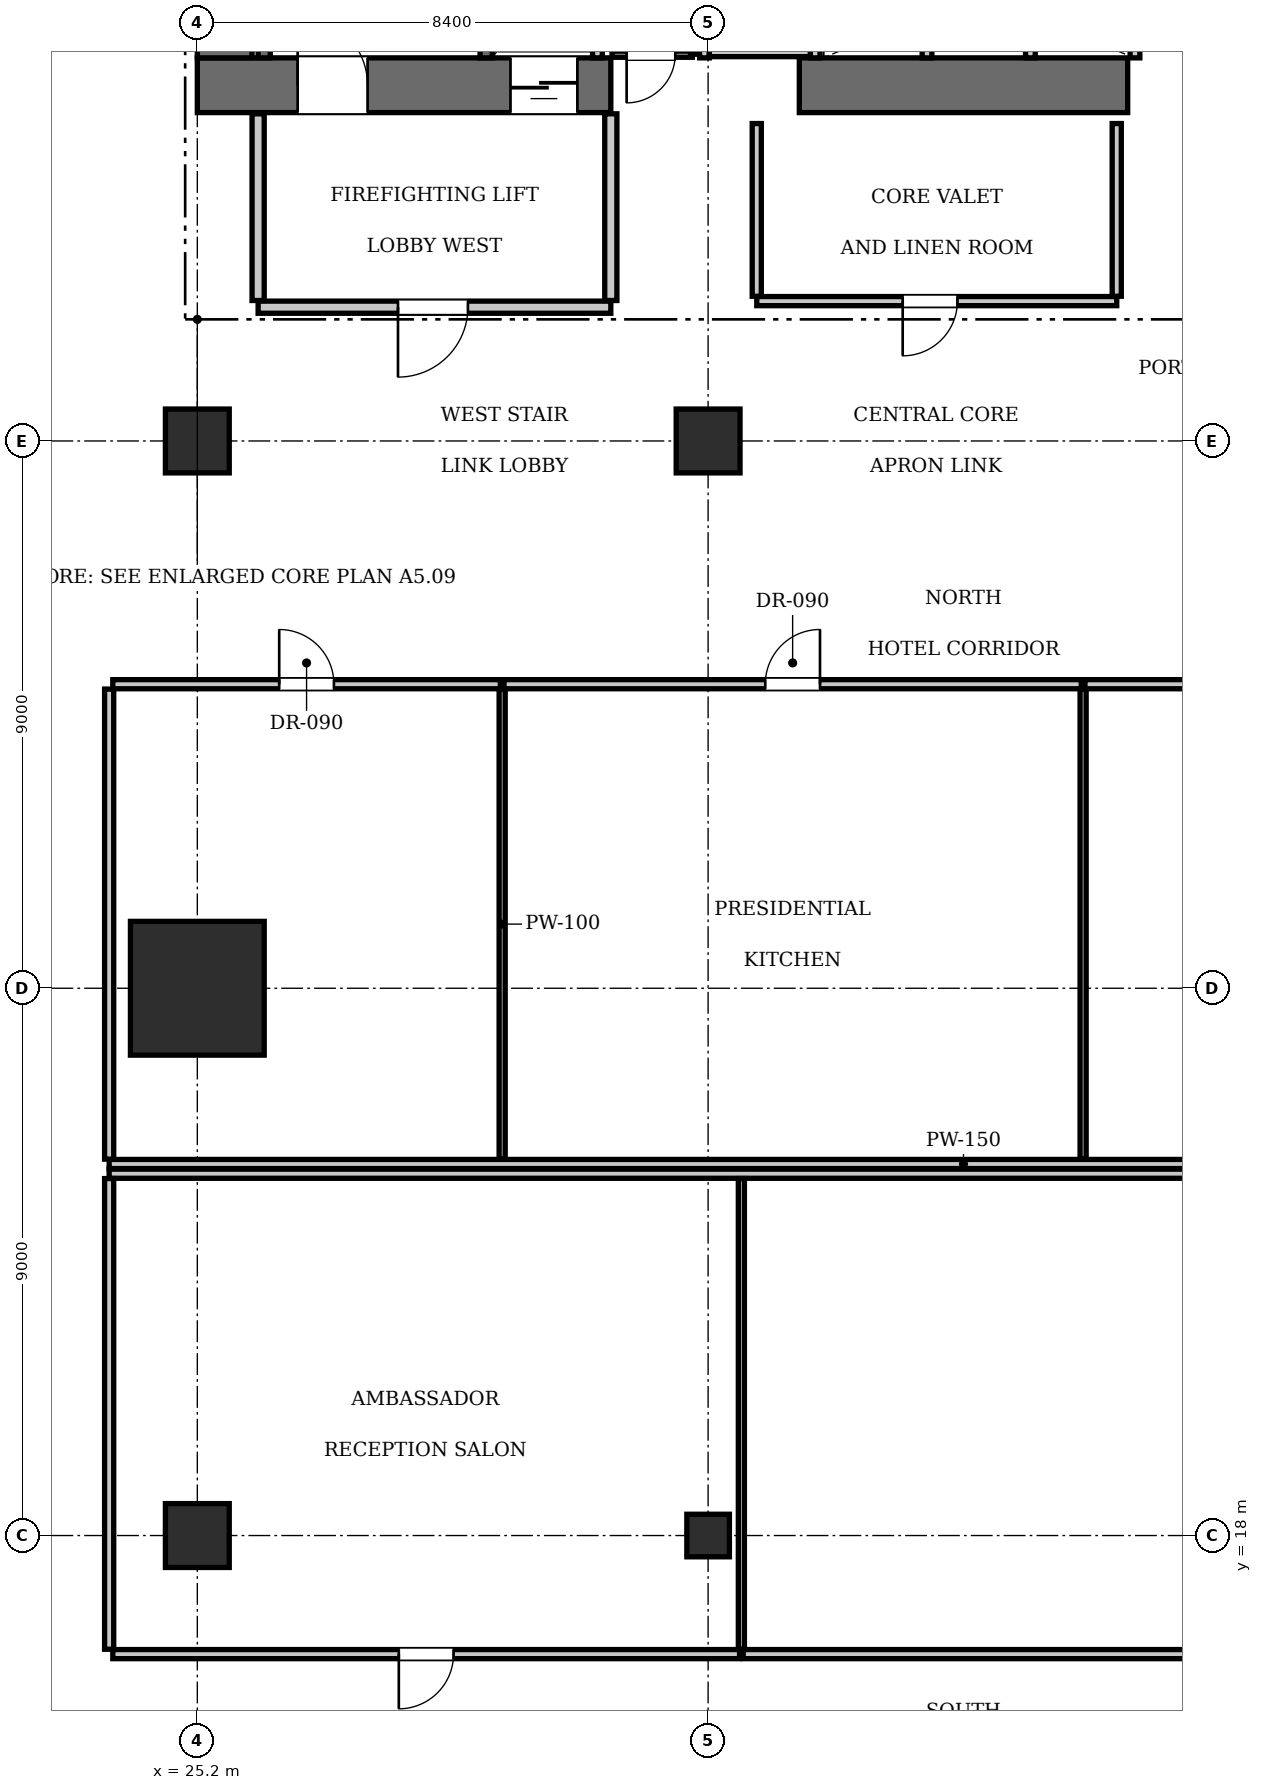
"""IFC4 building model, lengths in metres.
Left out: names, types, materials, properties, quantities, classifications, styles, units other than length and angle.
Written with IfcOpenShell. Run it as: python <this file> out.ifc"""

import sys

from ifc_helpers import new_model, si_unit, direction, frame, frame_2d, origin, origin_2d, place, context, subcontext, project, spatial, rectangle, i_section, extrude, element, fill, save


model = new_model("IFC4")
c1 = context("Model", 3, precision=1e-05, world=origin(), true_north=direction((0.0, 1.0)))
c2 = subcontext(c1, "Body", "Model", "MODEL_VIEW")
j1 = project(units=[si_unit("LENGTHUNIT", "METRE"), si_unit("PLANEANGLEUNIT", "RADIAN")], contexts=[c1])
p1 = place(None, origin())
s1 = spatial("IfcSite", under=j1, at=p1, CompositionType="ELEMENT")
p2 = place(p1, origin())
s2 = spatial("IfcBuilding", under=s1, at=p2, CompositionType="ELEMENT")
p3 = place(p2, frame((0.0, 0.0, 111.65)))
s3 = spatial("IfcBuildingStorey", under=s2, at=p3, CompositionType="ELEMENT", Elevation=111.65)
p4 = place(p3, frame((25.2, 27.0, 0.0), z_axis=(0.0, 0.0, 1.0), x_axis=(1.0, 0.0, 0.0)))
e1 = element("IfcColumn", 1, at=p4, inside=s3, PredefinedType="COLUMN", context=c2, shape_type="SweptSolid", body=[
    extrude(rectangle(XDim=2.2, YDim=2.2, at=origin_2d()), origin(), (0.0, 0.0, 1.0), 3.85),
])
p5 = place(p3, frame((25.2, 41.85, 0.0), z_axis=(0.0, 0.0, 1.0), x_axis=(1.0, 0.0, 0.0)))
e2 = element("IfcWall", 2, at=p5, inside=s3, PredefinedType="SHEAR", context=c2, shape_type="SweptSolid", body=[
    extrude(rectangle(XDim=6.8, YDim=0.9, at=frame_2d((3.4, 0.0))), origin(), (0.0, 0.0, 1.0), 3.85),
])
p6 = place(p5, frame((1.65, 0.0, 0.0)))
e3 = element("IfcOpeningElement", 3, at=p6, cuts=e2, PredefinedType="OPENING", context=c2, shape_type="SweptSolid", body=[
    extrude(rectangle(XDim=1.15, YDim=2.15, at=frame_2d((0.575, 1.075))), frame((0.0, 0.46, 0.0), z_axis=(0.0, -1.0, 0.0), x_axis=(1.0, 0.0, 0.0)), (0.0, 0.0, 1.0), 0.92),
])
p7 = place(p5, frame((5.15, 0.0, 0.0)))
e4 = element("IfcOpeningElement", 4, at=p7, cuts=e2, PredefinedType="OPENING", context=c2, shape_type="SweptSolid", body=[
    extrude(rectangle(XDim=1.1, YDim=2.2, at=frame_2d((0.55, 1.1))), frame((0.0, 0.46, 0.0), z_axis=(0.0, -1.0, 0.0), x_axis=(1.0, 0.0, 0.0)), (0.0, 0.0, 1.0), 0.92),
])
p8 = place(p3, frame((35.1, 41.85, 0.0), z_axis=(0.0, 0.0, 1.0), x_axis=(1.0, 0.0, 0.0)))
e5 = element("IfcWall", 5, at=p8, inside=s3, PredefinedType="SHEAR", context=c2, shape_type="SweptSolid", body=[
    extrude(rectangle(XDim=5.4, YDim=0.9, at=frame_2d((2.7, 0.0))), origin(), (0.0, 0.0, 1.0), 3.85),
])
p9 = place(p3, frame((25.65, 42.3, 0.0), z_axis=(0.0, 0.0, 1.0), x_axis=(0.0, 1.0, 0.0)))
e6 = element("IfcWall", 6, at=p9, inside=s3, PredefinedType="SHEAR", context=c2, shape_type="SweptSolid", body=[
    extrude(rectangle(XDim=1.6, YDim=0.9, at=frame_2d((0.8, 0.0))), origin(), (0.0, 0.0, 1.0), 3.85),
])
for number, where, z_axis, x_axis in (
    (7, (25.2, 36.0, 0.0), (0.0, 0.0, 1.0), (1.0, 0.0, 0.0)),
    (8, (33.6, 36.0, 0.0), (0.0, 0.0, 1.0), (1.0, 0.0, 0.0)),
    (9, (25.2, 18.0, 0.0), (0.0, 0.0, 1.0), (1.0, 0.0, 0.0)),
):
    element("IfcColumn", number, at=place(p3, frame(where, z_axis=z_axis, x_axis=x_axis)), inside=s3, PredefinedType="COLUMN", context=c2, shape_type="SweptSolid", body=[
        extrude(rectangle(XDim=1.05, YDim=1.05, at=origin_2d()), origin(), (0.0, 0.0, 1.0), 3.85),
    ])
p10 = place(p3, frame((33.6, 18.0, 0.0), z_axis=(0.0, 0.0, 1.0), x_axis=(1.0, 0.0, 0.0)))
e10 = element("IfcColumn", 10, at=p10, inside=s3, PredefinedType="COLUMN", context=c2, shape_type="SweptSolid", body=[
    extrude(i_section(OverallWidth=0.7, OverallDepth=0.7, WebThickness=0.028, FlangeThickness=0.044, at=origin_2d()), origin(), (0.0, 0.0, 1.0), 3.85),
])
p11 = place(p3, frame((29.95, 42.3, 0.0), z_axis=(0.0, 0.0, 1.0), x_axis=(0.0, 1.0, 0.0)))
e11 = element("IfcWall", 11, at=p11, inside=s3, PredefinedType="SOLIDWALL", context=c2, shape_type="SweptSolid", body=[
    extrude(rectangle(XDim=8.85, YDim=0.2, at=frame_2d((4.425, 0.0))), origin(), (0.0, 0.0, 1.0), 3.55),
])
p12 = place(p3, frame((26.3, 42.3, 0.0), z_axis=(0.0, 0.0, 1.0), x_axis=(0.0, 1.0, 0.0)))
e12 = element("IfcWall", 12, at=p12, inside=s3, PredefinedType="SOLIDWALL", context=c2, shape_type="SweptSolid", body=[
    extrude(rectangle(XDim=1.58, YDim=0.2, at=frame_2d((0.79, 0.0))), origin(), (0.0, 0.0, 1.0), 3.55),
])
p13 = place(p3, frame((31.78, 42.3, 0.0), z_axis=(0.0, 0.0, 1.0), x_axis=(0.0, 1.0, 0.0)))
e13 = element("IfcWall", 13, at=p13, inside=s3, PredefinedType="SOLIDWALL", context=c2, shape_type="SweptSolid", body=[
    extrude(rectangle(XDim=2.44, YDim=0.16, at=frame_2d((1.22, 0.0))), origin(), (0.0, 0.0, 1.0), 3.55),
])
for number, where, z_axis, x_axis in (
    (14, (37.2, 42.3, 0.0), (0.0, 0.0, 1.0), (0.0, 1.0, 0.0)),
    (15, (38.9, 42.3, 0.0), (0.0, 0.0, 1.0), (0.0, 1.0, 0.0)),
    (16, (40.62, 42.3, 0.0), (0.0, 0.0, 1.0), (0.0, 1.0, 0.0)),
):
    element("IfcWall", number, at=place(p3, frame(where, z_axis=z_axis, x_axis=x_axis)), inside=s3, PredefinedType="SOLIDWALL", context=c2, shape_type="SweptSolid", body=[
        extrude(rectangle(XDim=2.05, YDim=0.16, at=frame_2d((1.025, 0.0))), origin(), (0.0, 0.0, 1.0), 3.55),
    ])
for number, where, z_axis, x_axis in (
    (17, (33.54, 42.3, 0.0), (0.0, 0.0, 1.0), (0.0, 1.0, 0.0)),
    (18, (35.36, 42.3, 0.0), (0.0, 0.0, 1.0), (0.0, 1.0, 0.0)),
):
    element("IfcWall", number, at=place(p3, frame(where, z_axis=z_axis, x_axis=x_axis)), inside=s3, PredefinedType="SOLIDWALL", context=c2, shape_type="SweptSolid", body=[
        extrude(rectangle(XDim=2.1, YDim=0.16, at=frame_2d((1.05, 0.0))), origin(), (0.0, 0.0, 1.0), 3.55),
    ])
p14 = place(p3, frame((33.62, 42.4, 0.0), z_axis=(0.0, 0.0, 1.0), x_axis=(1.0, 0.0, 0.0)))
e19 = element("IfcWall", 19, at=p14, inside=s3, PredefinedType="SOLIDWALL", context=c2, shape_type="SweptSolid", body=[
    extrude(rectangle(XDim=1.66, YDim=0.16, at=frame_2d((0.83, 0.0))), origin(), (0.0, 0.0, 1.0), 3.55),
])
p15 = place(p3, frame((26.2, 38.2, 0.0), z_axis=(0.0, 0.0, 1.0), x_axis=(1.0, 0.0, 0.0)))
e20 = element("IfcWall", 20, at=p15, inside=s3, PredefinedType="PARTITIONING", context=c2, shape_type="SweptSolid", body=[
    extrude(rectangle(XDim=5.8, YDim=0.2, at=frame_2d((2.9, 0.0))), origin(), (0.0, 0.0, 1.0), 3.55),
])
p16 = place(p15, frame((2.3, 0.0, 0.0)))
e21 = element("IfcOpeningElement", 21, at=p16, cuts=e20, PredefinedType="OPENING", context=c2, shape_type="SweptSolid", body=[
    extrude(rectangle(XDim=1.15, YDim=2.15, at=frame_2d((0.575, 1.075))), frame((0.0, 0.11, 0.0), z_axis=(0.0, -1.0, 0.0), x_axis=(1.0, 0.0, 0.0)), (0.0, 0.0, 1.0), 0.22),
])
for number, where, z_axis, x_axis in (
    (22, (26.2, 38.31, 0.0), (0.0, 0.0, 1.0), (0.0, 1.0, 0.0)),
    (23, (32.0, 38.31, 0.0), (0.0, 0.0, 1.0), (0.0, 1.0, 0.0)),
):
    element("IfcWall", number, at=place(p3, frame(where, z_axis=z_axis, x_axis=x_axis)), inside=s3, PredefinedType="PARTITIONING", context=c2, shape_type="SweptSolid", body=[
        extrude(rectangle(XDim=3.07, YDim=0.2, at=frame_2d((1.535, 0.0))), origin(), (0.0, 0.0, 1.0), 3.55),
    ])
p17 = place(p3, frame((32.02, 42.36, 0.0), z_axis=(0.0, 0.0, 1.0), x_axis=(1.0, 0.0, 0.0)))
e24 = element("IfcWall", 24, at=p17, inside=s3, PredefinedType="PARTITIONING", context=c2, shape_type="SweptSolid", body=[
    extrude(rectangle(XDim=1.32, YDim=0.1, at=frame_2d((0.66, 0.0))), origin(), (0.0, 0.0, 1.0), 3.55),
])
p18 = place(p17, frame((0.24, 0.0, 0.0)))
e25 = element("IfcOpeningElement", 25, at=p18, cuts=e24, PredefinedType="OPENING", context=c2, shape_type="SweptSolid", body=[
    extrude(rectangle(XDim=0.8, YDim=2.05, at=frame_2d((0.4, 1.025))), frame((0.0, 0.06, 0.0), z_axis=(0.0, -1.0, 0.0), x_axis=(1.0, 0.0, 0.0)), (0.0, 0.0, 1.0), 0.12),
])
p19 = place(p3, frame((33.36, 42.36, 0.0), z_axis=(0.0, 0.0, 1.0), x_axis=(0.0, 1.0, 0.0)))
e26 = element("IfcWall", 26, at=p19, inside=s3, PredefinedType="PARTITIONING", context=c2, shape_type="SweptSolid", body=[
    extrude(rectangle(XDim=2.58, YDim=0.1, at=frame_2d((1.29, 0.0))), origin(), (0.0, 0.0, 1.0), 3.55),
])
p20 = place(p3, frame((34.4, 38.3, 0.0), z_axis=(0.0, 0.0, 1.0), x_axis=(1.0, 0.0, 0.0)))
e27 = element("IfcWall", 27, at=p20, inside=s3, PredefinedType="PARTITIONING", context=c2, shape_type="SweptSolid", body=[
    extrude(rectangle(XDim=5.92, YDim=0.15, at=frame_2d((2.96, 0.0))), origin(), (0.0, 0.0, 1.0), 3.55),
])
p21 = place(p20, frame((2.4, 0.0, 0.0)))
e28 = element("IfcOpeningElement", 28, at=p21, cuts=e27, PredefinedType="OPENING", context=c2, shape_type="SweptSolid", body=[
    extrude(rectangle(XDim=0.9, YDim=2.1, at=frame_2d((0.45, 1.05))), frame((0.0, 0.085, 0.0), z_axis=(0.0, -1.0, 0.0), x_axis=(1.0, 0.0, 0.0)), (0.0, 0.0, 1.0), 0.17),
])
for number, where, z_axis, x_axis in (
    (29, (34.4, 38.38, 0.0), (0.0, 0.0, 1.0), (0.0, 1.0, 0.0)),
    (30, (40.32, 38.38, 0.0), (0.0, 0.0, 1.0), (0.0, 1.0, 0.0)),
):
    element("IfcWall", number, at=place(p3, frame(where, z_axis=z_axis, x_axis=x_axis)), inside=s3, PredefinedType="PARTITIONING", context=c2, shape_type="SweptSolid", body=[
        extrude(rectangle(XDim=2.84, YDim=0.15, at=frame_2d((1.42, 0.0))), origin(), (0.0, 0.0, 1.0), 3.55),
    ])
p22 = place(p3, frame((23.75, 24.11, 0.0), z_axis=(0.0, 0.0, 1.0), x_axis=(1.0, 0.0, 0.0)))
e31 = element("IfcWall", 31, at=p22, inside=s3, PredefinedType="PARTITIONING", context=c2, shape_type="SweptSolid", body=[
    extrude(rectangle(XDim=28.1, YDim=0.15, at=frame_2d((14.05, 0.0))), origin(), (0.0, 0.0, 1.0), 3.55),
])
p23 = place(p3, frame((23.75, 24.19, 0.0), z_axis=(0.0, 0.0, 1.0), x_axis=(0.0, 1.0, 0.0)))
e32 = element("IfcWall", 32, at=p23, inside=s3, PredefinedType="PARTITIONING", context=c2, shape_type="SweptSolid", body=[
    extrude(rectangle(XDim=7.73, YDim=0.15, at=frame_2d((3.865, 0.0))), origin(), (0.0, 0.0, 1.0), 3.55),
])
p24 = place(p3, frame((23.81, 32.0, 0.0), z_axis=(0.0, 0.0, 1.0), x_axis=(1.0, 0.0, 0.0)))
e33 = element("IfcWall", 33, at=p24, inside=s3, PredefinedType="PARTITIONING", context=c2, shape_type="SweptSolid", body=[
    extrude(rectangle(XDim=6.373, YDim=0.15, at=frame_2d((3.187, 0.0))), origin(), (0.0, 0.0, 1.0), 3.55),
])
p25 = place(p24, frame((2.737, 0.0, 0.0)))
e34 = element("IfcOpeningElement", 34, at=p25, cuts=e33, PredefinedType="OPENING", context=c2, shape_type="SweptSolid", body=[
    extrude(rectangle(XDim=0.9, YDim=2.1, at=frame_2d((0.45, 1.05))), frame((0.0, 0.085, 0.0), z_axis=(0.0, -1.0, 0.0), x_axis=(1.0, 0.0, 0.0)), (0.0, 0.0, 1.0), 0.17),
])
p26 = place(p3, frame((30.213, 24.19, 0.0), z_axis=(0.0, 0.0, 1.0), x_axis=(0.0, 1.0, 0.0)))
e35 = element("IfcWall", 35, at=p26, inside=s3, PredefinedType="PARTITIONING", context=c2, shape_type="SweptSolid", body=[
    extrude(rectangle(XDim=7.73, YDim=0.1, at=frame_2d((3.865, 0.0))), origin(), (0.0, 0.0, 1.0), 3.55),
])
p27 = place(p3, frame((30.243, 32.0, 0.0), z_axis=(0.0, 0.0, 1.0), x_axis=(1.0, 0.0, 0.0)))
e36 = element("IfcWall", 36, at=p27, inside=s3, PredefinedType="PARTITIONING", context=c2, shape_type="SweptSolid", body=[
    extrude(rectangle(XDim=9.494, YDim=0.15, at=frame_2d((4.747, 0.0))), origin(), (0.0, 0.0, 1.0), 3.55),
])
p28 = place(p27, frame((4.297, 0.0, 0.0)))
e37 = element("IfcOpeningElement", 37, at=p28, cuts=e36, PredefinedType="OPENING", context=c2, shape_type="SweptSolid", body=[
    extrude(rectangle(XDim=0.9, YDim=2.1, at=frame_2d((0.45, 1.05))), frame((0.0, 0.085, 0.0), z_axis=(0.0, -1.0, 0.0), x_axis=(1.0, 0.0, 0.0)), (0.0, 0.0, 1.0), 0.17),
])
p29 = place(p3, frame((39.767, 24.19, 0.0), z_axis=(0.0, 0.0, 1.0), x_axis=(0.0, 1.0, 0.0)))
e38 = element("IfcWall", 38, at=p29, inside=s3, PredefinedType="PARTITIONING", context=c2, shape_type="SweptSolid", body=[
    extrude(rectangle(XDim=7.73, YDim=0.1, at=frame_2d((3.865, 0.0))), origin(), (0.0, 0.0, 1.0), 3.55),
])
p30 = place(p3, frame((39.797, 32.0, 0.0), z_axis=(0.0, 0.0, 1.0), x_axis=(1.0, 0.0, 0.0)))
e39 = element("IfcWall", 39, at=p30, inside=s3, PredefinedType="PARTITIONING", context=c2, shape_type="SweptSolid", body=[
    extrude(rectangle(XDim=11.993, YDim=0.15, at=frame_2d((5.997, 0.0))), origin(), (0.0, 0.0, 1.0), 3.55),
])
p31 = place(p30, frame((5.546, 0.0, 0.0)))
e40 = element("IfcOpeningElement", 40, at=p31, cuts=e39, PredefinedType="OPENING", context=c2, shape_type="SweptSolid", body=[
    extrude(rectangle(XDim=0.9, YDim=2.1, at=frame_2d((0.45, 1.05))), frame((0.0, 0.085, 0.0), z_axis=(0.0, -1.0, 0.0), x_axis=(1.0, 0.0, 0.0)), (0.0, 0.0, 1.0), 0.17),
])
p32 = place(p3, frame((23.75, 23.95, 0.0), z_axis=(0.0, 0.0, 1.0), x_axis=(1.0, 0.0, 0.0)))
e41 = element("IfcWall", 41, at=p32, inside=s3, PredefinedType="PARTITIONING", context=c2, shape_type="SweptSolid", body=[
    extrude(rectangle(XDim=28.1, YDim=0.15, at=frame_2d((14.05, 0.0))), origin(), (0.0, 0.0, 1.0), 3.55),
])
p33 = place(p3, frame((23.75, 16.13, 0.0), z_axis=(0.0, 0.0, 1.0), x_axis=(0.0, 1.0, 0.0)))
e42 = element("IfcWall", 42, at=p33, inside=s3, PredefinedType="PARTITIONING", context=c2, shape_type="SweptSolid", body=[
    extrude(rectangle(XDim=7.74, YDim=0.15, at=frame_2d((3.87, 0.0))), origin(), (0.0, 0.0, 1.0), 3.55),
])
p34 = place(p3, frame((23.81, 16.05, 0.0), z_axis=(0.0, 0.0, 1.0), x_axis=(1.0, 0.0, 0.0)))
e43 = element("IfcWall", 43, at=p34, inside=s3, PredefinedType="PARTITIONING", context=c2, shape_type="SweptSolid", body=[
    extrude(rectangle(XDim=10.307, YDim=0.15, at=frame_2d((5.153, 0.0))), origin(), (0.0, 0.0, 1.0), 3.55),
])
p35 = place(p34, frame((4.704, 0.0, 0.0)))
e44 = element("IfcOpeningElement", 44, at=p35, cuts=e43, PredefinedType="OPENING", context=c2, shape_type="SweptSolid", body=[
    extrude(rectangle(XDim=0.9, YDim=2.1, at=frame_2d((0.45, 1.05))), frame((0.0, 0.085, 0.0), z_axis=(0.0, -1.0, 0.0), x_axis=(1.0, 0.0, 0.0)), (0.0, 0.0, 1.0), 0.17),
])
p36 = place(p3, frame((34.147, 16.13, 0.0), z_axis=(0.0, 0.0, 1.0), x_axis=(0.0, 1.0, 0.0)))
e45 = element("IfcWall", 45, at=p36, inside=s3, PredefinedType="PARTITIONING", context=c2, shape_type="SweptSolid", body=[
    extrude(rectangle(XDim=7.74, YDim=0.1, at=frame_2d((3.87, 0.0))), origin(), (0.0, 0.0, 1.0), 3.55),
])
p37 = place(p3, frame((34.177, 16.05, 0.0), z_axis=(0.0, 0.0, 1.0), x_axis=(1.0, 0.0, 0.0)))
e46 = element("IfcWall", 46, at=p37, inside=s3, PredefinedType="PARTITIONING", context=c2, shape_type="SweptSolid", body=[
    extrude(rectangle(XDim=17.613, YDim=0.15, at=frame_2d((8.807, 0.0))), origin(), (0.0, 0.0, 1.0), 3.55),
])
p38 = place(p37, frame((8.356, 0.0, 0.0)))
e47 = element("IfcOpeningElement", 47, at=p38, cuts=e46, PredefinedType="OPENING", context=c2, shape_type="SweptSolid", body=[
    extrude(rectangle(XDim=0.9, YDim=2.1, at=frame_2d((0.45, 1.05))), frame((0.0, 0.085, 0.0), z_axis=(0.0, -1.0, 0.0), x_axis=(1.0, 0.0, 0.0)), (0.0, 0.0, 1.0), 0.17),
])
p39 = place(p6, origin())
e48 = element("IfcDoor", 48, at=p39, inside=s3, OperationType="SINGLE_SWING_LEFT", PredefinedType="DOOR", context=c2, shape_type="SweptSolid", body=[
    extrude(rectangle(XDim=1.15, YDim=2.15, at=frame_2d((0.575, 1.075))), frame((0.0, 0.025, 0.0), z_axis=(0.0, -1.0, 0.0), x_axis=(1.0, 0.0, 0.0)), (0.0, 0.0, 1.0), 0.05),
])
fill(e3, e48)
p40 = place(p7, frame((1.1, 0.0, 0.0), z_axis=(0.0, 0.0, 1.0), x_axis=(-1.0, 0.0, 0.0)))
e49 = element("IfcDoor", 49, at=p40, inside=s3, OperationType="SLIDING_TO_LEFT", PredefinedType="DOOR", context=c2, shape_type="SweptSolid", body=[
    extrude(rectangle(XDim=1.1, YDim=2.2, at=frame_2d((0.55, 1.1))), frame((0.0, 0.025, 0.0), z_axis=(0.0, -1.0, 0.0), x_axis=(1.0, 0.0, 0.0)), (0.0, 0.0, 1.0), 0.05),
])
fill(e4, e49)
p41 = place(p16, frame((1.15, 0.0, 0.0), z_axis=(0.0, 0.0, 1.0), x_axis=(-1.0, 0.0, 0.0)))
e50 = element("IfcDoor", 50, at=p41, inside=s3, OperationType="SINGLE_SWING_RIGHT", PredefinedType="DOOR", context=c2, shape_type="SweptSolid", body=[
    extrude(rectangle(XDim=1.15, YDim=2.15, at=frame_2d((0.575, 1.075))), frame((0.0, 0.025, 0.0), z_axis=(0.0, -1.0, 0.0), x_axis=(1.0, 0.0, 0.0)), (0.0, 0.0, 1.0), 0.05),
])
fill(e21, e50)
p42 = place(p18, frame((0.8, 0.0, 0.0), z_axis=(0.0, 0.0, 1.0), x_axis=(-1.0, 0.0, 0.0)))
e51 = element("IfcDoor", 51, at=p42, inside=s3, OperationType="SINGLE_SWING_RIGHT", PredefinedType="DOOR", context=c2, shape_type="SweptSolid", body=[
    extrude(rectangle(XDim=0.8, YDim=2.05, at=frame_2d((0.4, 1.025))), frame((0.0, 0.025, 0.0), z_axis=(0.0, -1.0, 0.0), x_axis=(1.0, 0.0, 0.0)), (0.0, 0.0, 1.0), 0.05),
])
fill(e25, e51)
p43 = place(p21, frame((0.9, 0.0, 0.0), z_axis=(0.0, 0.0, 1.0), x_axis=(-1.0, 0.0, 0.0)))
e52 = element("IfcDoor", 52, at=p43, inside=s3, OperationType="SINGLE_SWING_RIGHT", PredefinedType="DOOR", context=c2, shape_type="SweptSolid", body=[
    extrude(rectangle(XDim=0.9, YDim=2.1, at=frame_2d((0.45, 1.05))), frame((0.0, 0.025, 0.0), z_axis=(0.0, -1.0, 0.0), x_axis=(1.0, 0.0, 0.0)), (0.0, 0.0, 1.0), 0.05),
])
fill(e28, e52)
p44 = place(p25, origin())
e53 = element("IfcDoor", 53, at=p44, inside=s3, OperationType="SINGLE_SWING_LEFT", PredefinedType="DOOR", context=c2, shape_type="SweptSolid", body=[
    extrude(rectangle(XDim=0.9, YDim=2.1, at=frame_2d((0.45, 1.05))), frame((0.0, 0.025, 0.0), z_axis=(0.0, -1.0, 0.0), x_axis=(1.0, 0.0, 0.0)), (0.0, 0.0, 1.0), 0.05),
])
fill(e34, e53)
p45 = place(p28, origin())
e54 = element("IfcDoor", 54, at=p45, inside=s3, OperationType="SINGLE_SWING_RIGHT", PredefinedType="DOOR", context=c2, shape_type="SweptSolid", body=[
    extrude(rectangle(XDim=0.9, YDim=2.1, at=frame_2d((0.45, 1.05))), frame((0.0, 0.025, 0.0), z_axis=(0.0, -1.0, 0.0), x_axis=(1.0, 0.0, 0.0)), (0.0, 0.0, 1.0), 0.05),
])
fill(e37, e54)
p46 = place(p35, frame((0.9, 0.0, 0.0), z_axis=(0.0, 0.0, 1.0), x_axis=(-1.0, 0.0, 0.0)))
e55 = element("IfcDoor", 55, at=p46, inside=s3, OperationType="SINGLE_SWING_RIGHT", PredefinedType="DOOR", context=c2, shape_type="SweptSolid", body=[
    extrude(rectangle(XDim=0.9, YDim=2.1, at=frame_2d((0.45, 1.05))), frame((0.0, 0.025, 0.0), z_axis=(0.0, -1.0, 0.0), x_axis=(1.0, 0.0, 0.0)), (0.0, 0.0, 1.0), 0.05),
])
fill(e44, e55)
save(model, sys.argv[1])
